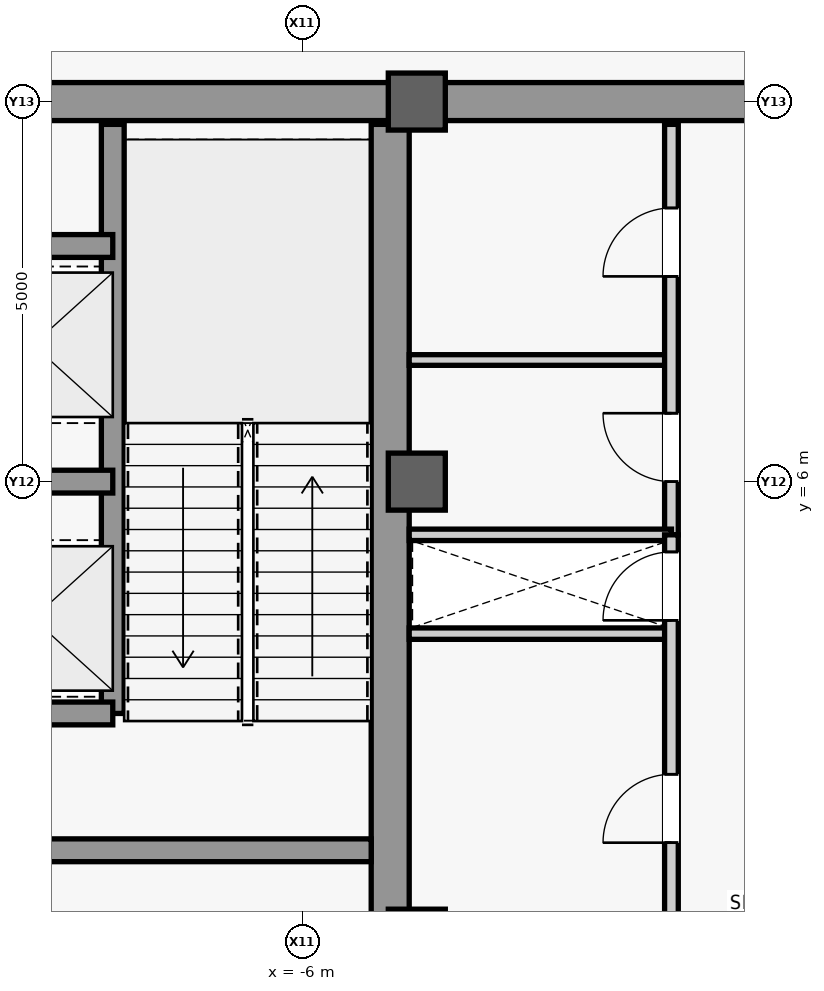
"""IFC4 building model, lengths in metres.
Left out: names, types, materials, properties, quantities, classifications, styles, units other than length and angle.
Written with IfcOpenShell. Run it as: python <this file> out.ifc"""

import sys

from ifc_helpers import new_model, si_unit, direction, frame, frame_2d, origin, origin_2d, place, context, subcontext, project, spatial, rectangle, extrude, source, transform, mapped, element, fill, save


model = new_model("IFC4")
c1 = context("Model", 3, precision=1e-05, world=origin(), true_north=direction((0.0, 1.0)))
c2 = subcontext(c1, "Body", "Model", "MODEL_VIEW")
j1 = project(units=[si_unit("LENGTHUNIT", "METRE"), si_unit("PLANEANGLEUNIT", "RADIAN")], contexts=[c1])
p1 = place(None, origin())
s1 = spatial("IfcSite", under=j1, at=p1, CompositionType="ELEMENT")
p2 = place(p1, origin())
s2 = spatial("IfcBuilding", under=s1, at=p2, CompositionType="ELEMENT")
p3 = place(p2, frame((0.0, 0.0, 370.3)))
s3 = spatial("IfcBuildingStorey", under=s2, at=p3, CompositionType="ELEMENT", Elevation=370.3)
m1 = source(origin(), c2, "Body", "SweptSolid", [
    extrude(rectangle(XDim=21.4, YDim=0.5, at=frame_2d((10.7, 0.0))), origin(), (0.0, 0.0, 1.0), 4.6),
])
p4 = place(p3, frame((-4.85, -10.7, 0.0), z_axis=(0.0, 0.0, 1.0), x_axis=(0.0, 1.0, 0.0)))
e1 = element("IfcWall", 1, at=p4, inside=s3, PredefinedType="SHEAR", context=c2, shape_type="MappedRepresentation", body=[
    mapped(m1, transform((0.0, 0.0, 0.0), scale=1.0)),
])
m2 = source(origin(), c2, "Body", "SweptSolid", [
    extrude(rectangle(XDim=5.9, YDim=0.5, at=frame_2d((2.95, 0.0))), origin(), (0.0, 0.0, 1.0), 4.6),
])
p5 = place(p3, frame((-10.75, 11.0, 0.0), z_axis=(0.0, 0.0, 1.0), x_axis=(1.0, 0.0, 0.0)))
e2 = element("IfcWall", 2, at=p5, inside=s3, PredefinedType="SHEAR", context=c2, shape_type="MappedRepresentation", body=[
    mapped(m2, transform((0.0, 0.0, 0.0), scale=1.0)),
])
m3 = source(origin(), c2, "Body", "SweptSolid", [
    extrude(rectangle(XDim=5.65, YDim=0.3, at=frame_2d((2.825, 0.0))), origin(), (0.0, 0.0, 1.0), 4.6),
])
p6 = place(p3, frame((-10.75, 1.15, 0.0), z_axis=(0.0, 0.0, 1.0), x_axis=(1.0, 0.0, 0.0)))
e3 = element("IfcWall", 3, at=p6, inside=s3, PredefinedType="SHEAR", context=c2, shape_type="MappedRepresentation", body=[
    mapped(m3, transform((0.0, 0.0, 0.0), scale=1.0)),
])
m4 = source(origin(), c2, "Body", "SweptSolid", [
    extrude(rectangle(XDim=9.2, YDim=0.5, at=frame_2d((4.6, 0.0))), origin(), (0.0, 0.0, 1.0), 4.6),
])
p7 = place(p3, frame((-4.6, 11.0, 0.0), z_axis=(0.0, 0.0, 1.0), x_axis=(1.0, 0.0, 0.0)))
e4 = element("IfcWall", 4, at=p7, inside=s3, PredefinedType="SHEAR", context=c2, shape_type="MappedRepresentation", body=[
    mapped(m4, transform((0.0, 0.0, 0.0), scale=1.0)),
])
m5 = source(origin(), c2, "Body", "SweptSolid", [
    extrude(rectangle(XDim=0.75, YDim=0.75, at=origin_2d()), origin(), (0.0, 0.0, 1.0), 5.2),
])
for number, where, z_axis, x_axis in (
    (5, (-4.5, 0.0, 0.0), (0.0, 0.0, 1.0), (1.0, 0.0, 0.0)),
    (6, (-4.5, 6.0, 0.0), (0.0, 0.0, 1.0), (1.0, 0.0, 0.0)),
    (7, (-4.5, 11.0, 0.0), (0.0, 0.0, 1.0), (1.0, 0.0, 0.0)),
):
    element("IfcColumn", number, at=place(p3, frame(where, z_axis=z_axis, x_axis=x_axis)), inside=s3, PredefinedType="COLUMN", context=c2, shape_type="MappedRepresentation", body=[
        mapped(m5, transform((0.0, 0.0, 0.0), scale=1.0)),
    ])
m6 = source(origin(), c2, "Body", "SweptSolid", [
    extrude(rectangle(XDim=7.75, YDim=0.3, at=frame_2d((3.875, 0.0))), origin(), (0.0, 0.0, 1.0), 4.6),
])
p8 = place(p3, frame((-8.5, 2.95, 0.0), z_axis=(0.0, 0.0, 1.0), x_axis=(0.0, 1.0, 0.0)))
e8 = element("IfcWall", 8, at=p8, inside=s3, PredefinedType="SHEAR", context=c2, shape_type="MappedRepresentation", body=[
    mapped(m6, transform((0.0, 0.0, 0.0), scale=1.0)),
])
m7 = source(origin(), c2, "Body", "SweptSolid", [
    extrude(rectangle(XDim=2.2, YDim=0.3, at=frame_2d((1.1, 0.0))), origin(), (0.0, 0.0, 1.0), 4.6),
])
for number, where, z_axis, x_axis in (
    (9, (-10.7, 2.95, 0.0), (0.0, 0.0, 1.0), (1.0, 0.0, 0.0)),
    (10, (-10.7, 6.0, 0.0), (0.0, 0.0, 1.0), (1.0, 0.0, 0.0)),
    (11, (-10.7, 9.1, 0.0), (0.0, 0.0, 1.0), (1.0, 0.0, 0.0)),
):
    element("IfcWall", number, at=place(p3, frame(where, z_axis=z_axis, x_axis=x_axis)), inside=s3, PredefinedType="SHEAR", context=c2, shape_type="MappedRepresentation", body=[
        mapped(m7, transform((0.0, 0.0, 0.0), scale=1.0)),
    ])
m8 = source(origin(), c2, "Body", "SweptSolid", [
    extrude(rectangle(XDim=3.45, YDim=0.15, at=frame_2d((1.725, 0.0))), origin(), (0.0, 0.0, 1.0), 4.6),
])
p9 = place(p3, frame((-4.6, 4.0, 0.0), z_axis=(0.0, 0.0, 1.0), x_axis=(1.0, 0.0, 0.0)))
e12 = element("IfcWall", 12, at=p9, inside=s3, PredefinedType="PARTITIONING", context=c2, shape_type="MappedRepresentation", body=[
    mapped(m8, transform((0.0, 0.0, 0.0), scale=1.0)),
])
m9 = source(origin(), c2, "Body", "SweptSolid", [
    extrude(rectangle(XDim=3.45, YDim=0.14, at=frame_2d((1.725, 0.0))), origin(), (0.0, 0.0, 1.0), 4.6),
])
p10 = place(p3, frame((-4.6, 7.6, 0.0), z_axis=(0.0, 0.0, 1.0), x_axis=(1.0, 0.0, 0.0)))
e13 = element("IfcWall", 13, at=p10, inside=s3, PredefinedType="PARTITIONING", context=c2, shape_type="MappedRepresentation", body=[
    mapped(m9, transform((0.0, 0.0, 0.0), scale=1.0)),
])
m10 = source(origin(), c2, "Body", "SweptSolid", [
    extrude(rectangle(XDim=5.4, YDim=0.18, at=frame_2d((2.7, 0.0))), origin(), (0.0, 0.0, 1.0), 4.6),
])
p11 = place(p3, frame((-1.15, 5.3, 0.0), z_axis=(0.0, 0.0, 1.0), x_axis=(0.0, 1.0, 0.0)))
e14 = element("IfcWall", 14, at=p11, inside=s3, PredefinedType="PARTITIONING", context=c2, shape_type="MappedRepresentation", body=[
    mapped(m10, transform((0.0, 0.0, 0.0), scale=1.0)),
])
m11 = source(origin(), c2, "Body", "SweptSolid", [
    extrude(rectangle(XDim=0.9, YDim=2.15, at=frame_2d((0.45, 1.075))), frame((0.0, 0.1, 0.0), z_axis=(0.0, -1.0, 0.0), x_axis=(1.0, 0.0, 0.0)), (0.0, 0.0, 1.0), 0.2),
])
p12 = place(p11, frame((0.7, 0.0, 0.0)))
e15 = element("IfcOpeningElement", 15, at=p12, cuts=e14, PredefinedType="OPENING", context=c2, shape_type="MappedRepresentation", body=[
    mapped(m11, transform((0.0, 0.0, 0.0), scale=1.0)),
])
p13 = place(p11, frame((3.4, 0.0, 0.0)))
e16 = element("IfcOpeningElement", 16, at=p13, cuts=e14, PredefinedType="OPENING", context=c2, shape_type="MappedRepresentation", body=[
    mapped(m11, transform((0.0, 0.0, 0.0), scale=1.0)),
])
p14 = place(p3, frame((-4.6, 5.3, 0.0), z_axis=(0.0, 0.0, 1.0), x_axis=(1.0, 0.0, 0.0)))
e17 = element("IfcWall", 17, at=p14, inside=s3, PredefinedType="PARTITIONING", context=c2, shape_type="MappedRepresentation", body=[
    mapped(m8, transform((0.0, 0.0, 0.0), scale=1.0)),
])
m12 = source(origin(), c2, "Body", "SweptSolid", [
    extrude(rectangle(XDim=10.6, YDim=0.18, at=frame_2d((5.3, 0.0))), origin(), (0.0, 0.0, 1.0), 4.6),
])
p15 = place(p3, frame((-1.15, -5.3, 0.0), z_axis=(0.0, 0.0, 1.0), x_axis=(0.0, 1.0, 0.0)))
e18 = element("IfcWall", 18, at=p15, inside=s3, PredefinedType="PARTITIONING", context=c2, shape_type="MappedRepresentation", body=[
    mapped(m12, transform((0.0, 0.0, 0.0), scale=1.0)),
])
p16 = place(p15, frame((1.9, 0.0, 0.0)))
e19 = element("IfcOpeningElement", 19, at=p16, cuts=e18, PredefinedType="OPENING", context=c2, shape_type="MappedRepresentation", body=[
    mapped(m11, transform((0.0, 0.0, 0.0), scale=1.0)),
])
p17 = place(p15, frame((6.55, 0.0, 0.0)))
e20 = element("IfcOpeningElement", 20, at=p17, cuts=e18, PredefinedType="OPENING", context=c2, shape_type="MappedRepresentation", body=[
    mapped(m11, transform((0.0, 0.0, 0.0), scale=1.0)),
])
p18 = place(p15, frame((9.475, 0.0, 0.0)))
e21 = element("IfcOpeningElement", 21, at=p18, cuts=e18, PredefinedType="OPENING", context=c2, shape_type="MappedRepresentation", body=[
    mapped(m11, transform((0.0, 0.0, 0.0), scale=1.0)),
])
m13 = source(origin(), c2, "Body", "SweptSolid", [
    extrude(rectangle(XDim=0.9, YDim=2.15, at=frame_2d((0.45, 1.075))), frame((0.0, 0.025, 0.0), z_axis=(0.0, -1.0, 0.0), x_axis=(1.0, 0.0, 0.0)), (0.0, 0.0, 1.0), 0.05),
])
p19 = place(p12, origin())
e22 = element("IfcDoor", 22, at=p19, inside=s3, OperationType="SINGLE_SWING_RIGHT", PredefinedType="DOOR", context=c2, shape_type="MappedRepresentation", body=[
    mapped(m13, transform((0.0, 0.0, 0.0), scale=1.0)),
])
fill(e15, e22)
p20 = place(p13, origin())
e23 = element("IfcDoor", 23, at=p20, inside=s3, OperationType="SINGLE_SWING_LEFT", PredefinedType="DOOR", context=c2, shape_type="MappedRepresentation", body=[
    mapped(m13, transform((0.0, 0.0, 0.0), scale=1.0)),
])
fill(e16, e23)
p21 = place(p17, origin())
e24 = element("IfcDoor", 24, at=p21, inside=s3, OperationType="SINGLE_SWING_LEFT", PredefinedType="DOOR", context=c2, shape_type="MappedRepresentation", body=[
    mapped(m13, transform((0.0, 0.0, 0.0), scale=1.0)),
])
fill(e20, e24)
p22 = place(p18, origin())
e25 = element("IfcDoor", 25, at=p22, inside=s3, OperationType="SINGLE_SWING_LEFT", PredefinedType="DOOR", context=c2, shape_type="MappedRepresentation", body=[
    mapped(m13, transform((0.0, 0.0, 0.0), scale=1.0)),
])
fill(e21, e25)
save(model, sys.argv[1])
